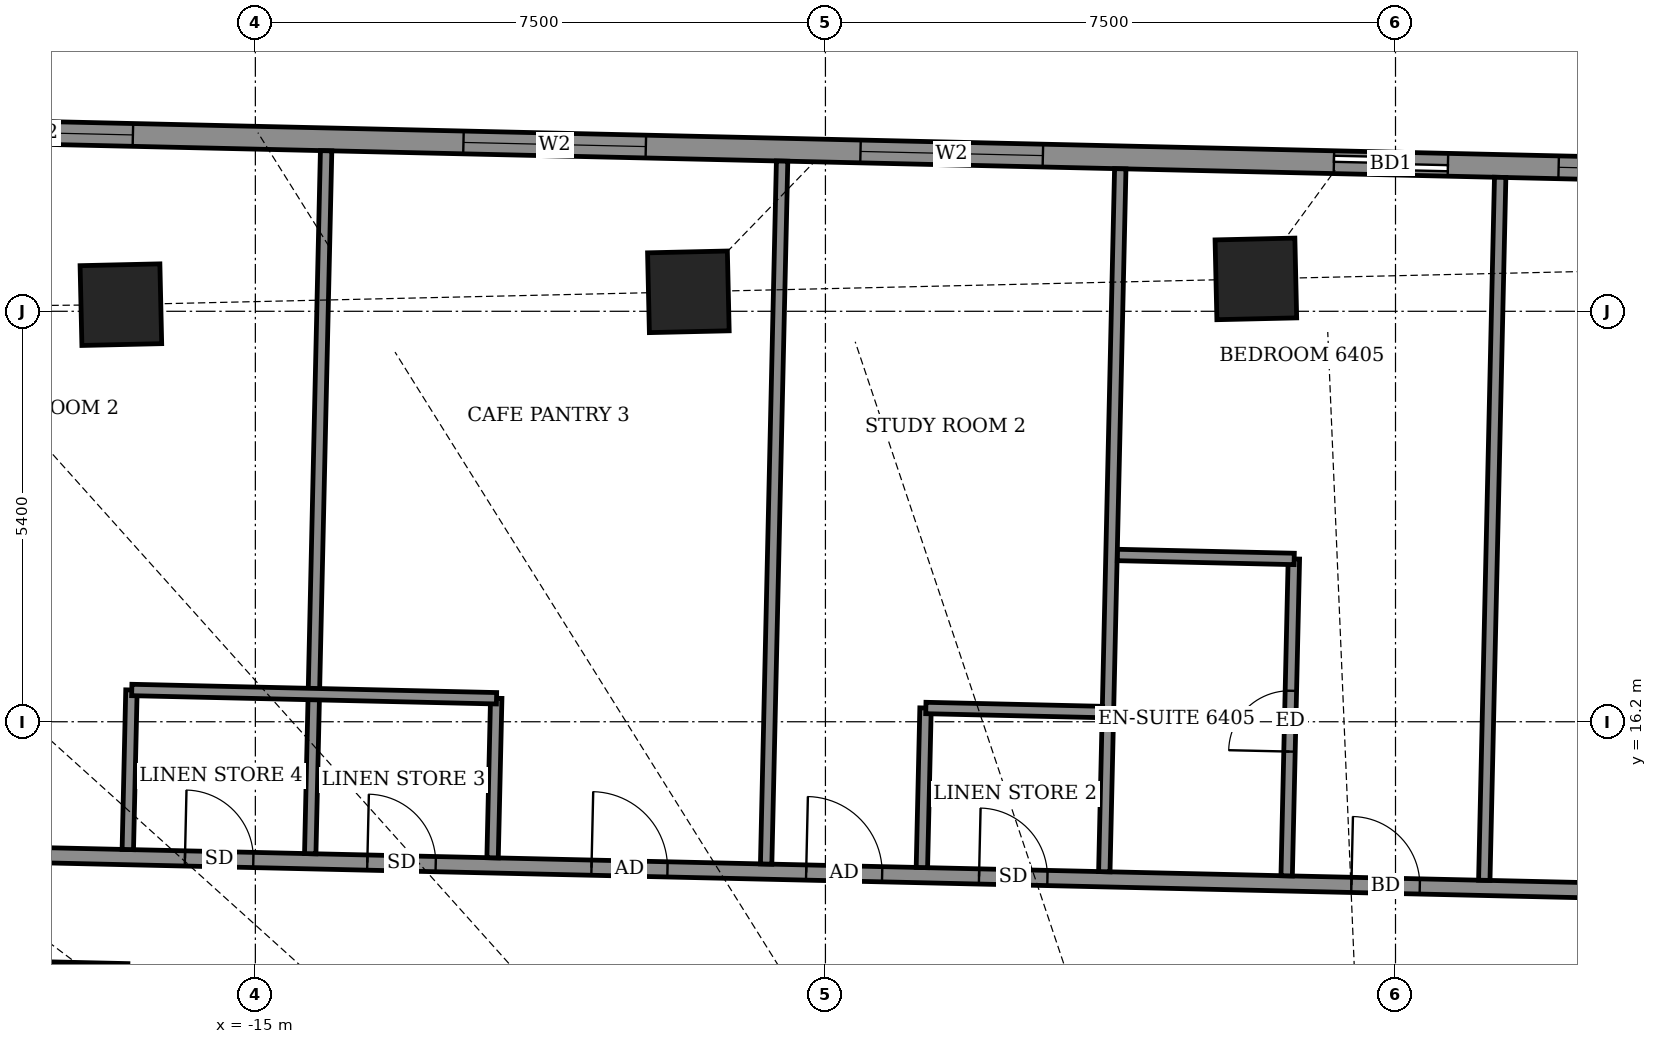
"""IFC4 building model, lengths in metres.
Left out: names, types, materials, properties, quantities, classifications, styles, units other than length and angle.
Written with IfcOpenShell. Run it as: python <this file> out.ifc"""

import sys

from ifc_helpers import new_model, si_unit, direction, frame, frame_2d, origin, origin_2d, place, context, subcontext, project, spatial, rectangle, extrude, element, fill, save


model = new_model("IFC4")
c1 = context("Model", 3, precision=1e-05, world=origin(), true_north=direction((0.0, 1.0)))
c2 = subcontext(c1, "Body", "Model", "MODEL_VIEW")
j1 = project(units=[si_unit("LENGTHUNIT", "METRE"), si_unit("PLANEANGLEUNIT", "RADIAN")], contexts=[c1])
p1 = place(None, origin())
s1 = spatial("IfcSite", under=j1, at=p1, CompositionType="ELEMENT")
p2 = place(p1, origin())
s2 = spatial("IfcBuilding", under=s1, at=p2, CompositionType="ELEMENT")
p3 = place(p2, frame((0.0, 0.0, 252.7)))
s3 = spatial("IfcBuildingStorey", under=s2, at=p3, CompositionType="ELEMENT", Elevation=252.7)
for number, where, z_axis, x_axis in (
    (1, (-1.837, 22.026, -0.55), (0.0, 0.0, 1.0), (-1.0, -0.023, 0.0)),
    (2, (-9.303, 21.856, -0.55), (0.0, 0.0, 1.0), (-1.0, -0.023, 0.0)),
    (3, (-16.769, 21.687, -0.55), (0.0, 0.0, 1.0), (-1.0, -0.023, 0.0)),
):
    element("IfcColumn", number, at=place(p3, frame(where, z_axis=z_axis, x_axis=x_axis)), inside=s3, PredefinedType="COLUMN", context=c2, shape_type="SweptSolid", body=[
        extrude(rectangle(XDim=1.05, YDim=1.05, at=origin_2d()), origin(), (0.0, 0.0, 1.0), 4.6),
    ])
p4 = place(p3, frame((26.35, 22.945, 0.0), z_axis=(0.0, 0.0, 1.0), x_axis=(-0.999742523712, 0.022691105788, 0.0)))
e4 = element("IfcWall", 4, at=p4, inside=s3, PredefinedType="SOLIDWALL", context=c2, shape_type="SweptSolid", body=[
    extrude(rectangle(XDim=47.771, YDim=0.3, at=frame_2d((23.886, 0.0))), origin(), (0.0, 0.0, 1.0), 2.45),
])
p5 = place(p4, frame((1.969, 0.0, 0.0)))
e5 = element("IfcOpeningElement", 5, at=p5, cuts=e4, PredefinedType="OPENING", context=c2, shape_type="SweptSolid", body=[
    extrude(rectangle(XDim=1.5, YDim=2.4, at=frame_2d((0.75, 1.2))), frame((0.0, 0.16, 0.0), z_axis=(0.0, -1.0, 0.0), x_axis=(1.0, 0.0, 0.0)), (0.0, 0.0, 1.0), 0.32),
])
p6 = place(p4, frame((9.356, 0.0, 0.9)))
e6 = element("IfcOpeningElement", 6, at=p6, cuts=e4, PredefinedType="OPENING", context=c2, shape_type="SweptSolid", body=[
    extrude(rectangle(XDim=2.4, YDim=1.5, at=frame_2d((1.2, 0.75))), frame((0.0, 0.16, 0.0), z_axis=(0.0, -1.0, 0.0), x_axis=(1.0, 0.0, 0.0)), (0.0, 0.0, 1.0), 0.32),
])
p7 = place(p4, frame((21.81, 0.0, 0.9)))
e7 = element("IfcOpeningElement", 7, at=p7, cuts=e4, PredefinedType="OPENING", context=c2, shape_type="SweptSolid", body=[
    extrude(rectangle(XDim=2.4, YDim=1.5, at=frame_2d((1.2, 0.75))), frame((0.0, 0.16, 0.0), z_axis=(0.0, -1.0, 0.0), x_axis=(1.0, 0.0, 0.0)), (0.0, 0.0, 1.0), 0.32),
])
p8 = place(p4, frame((25.667, 0.0, 0.0)))
e8 = element("IfcOpeningElement", 8, at=p8, cuts=e4, PredefinedType="OPENING", context=c2, shape_type="SweptSolid", body=[
    extrude(rectangle(XDim=1.5, YDim=2.4, at=frame_2d((0.75, 1.2))), frame((0.0, 0.16, 0.0), z_axis=(0.0, -1.0, 0.0), x_axis=(1.0, 0.0, 0.0)), (0.0, 0.0, 1.0), 0.32),
])
p9 = place(p4, frame((30.997, 0.0, 0.9)))
e9 = element("IfcOpeningElement", 9, at=p9, cuts=e4, PredefinedType="OPENING", context=c2, shape_type="SweptSolid", body=[
    extrude(rectangle(XDim=2.4, YDim=1.5, at=frame_2d((1.2, 0.75))), frame((0.0, 0.16, 0.0), z_axis=(0.0, -1.0, 0.0), x_axis=(1.0, 0.0, 0.0)), (0.0, 0.0, 1.0), 0.32),
])
p10 = place(p4, frame((36.222, 0.0, 0.9)))
e10 = element("IfcOpeningElement", 10, at=p10, cuts=e4, PredefinedType="OPENING", context=c2, shape_type="SweptSolid", body=[
    extrude(rectangle(XDim=2.4, YDim=1.5, at=frame_2d((1.2, 0.75))), frame((0.0, 0.16, 0.0), z_axis=(0.0, -1.0, 0.0), x_axis=(1.0, 0.0, 0.0)), (0.0, 0.0, 1.0), 0.32),
])
p11 = place(p4, frame((42.972, 0.0, 0.9)))
e11 = element("IfcOpeningElement", 11, at=p11, cuts=e4, PredefinedType="OPENING", context=c2, shape_type="SweptSolid", body=[
    extrude(rectangle(XDim=2.4, YDim=1.5, at=frame_2d((1.2, 0.75))), frame((0.0, 0.16, 0.0), z_axis=(0.0, -1.0, 0.0), x_axis=(1.0, 0.0, 0.0)), (0.0, 0.0, 1.0), 0.32),
])
p12 = place(p3, frame((-25.008, 13.107, 0.0), z_axis=(0.0, 0.0, 1.0), x_axis=(0.999742742467, -0.022681465666, 0.0)))
e12 = element("IfcWall", 12, at=p12, inside=s3, PredefinedType="PARTITIONING", context=c2, shape_type="SweptSolid", body=[
    extrude(rectangle(XDim=8.331, YDim=0.2, at=frame_2d((4.166, 0.0))), origin(), (0.0, 0.0, 1.0), 2.55),
])
p13 = place(p12, frame((2.966, 0.0, 0.0)))
e13 = element("IfcOpeningElement", 13, at=p13, cuts=e12, PredefinedType="OPENING", context=c2, shape_type="SweptSolid", body=[
    extrude(rectangle(XDim=1.0, YDim=2.1, at=frame_2d((0.5, 1.05))), frame((0.0, 0.11, 0.0), z_axis=(0.0, -1.0, 0.0), x_axis=(1.0, 0.0, 0.0)), (0.0, 0.0, 1.0), 0.22),
])
p14 = place(p3, frame((-24.974, 14.607, 0.0), z_axis=(0.0, 0.0, 1.0), x_axis=(0.999742823946, -0.02267787398, 0.0)))
e14 = element("IfcWall", 14, at=p14, inside=s3, PredefinedType="PARTITIONING", context=c2, shape_type="SweptSolid", body=[
    extrude(rectangle(XDim=48.284, YDim=0.2, at=frame_2d((24.142, 0.0))), origin(), (0.0, 0.0, 1.0), 2.45),
])
p15 = place(p14, frame((46.283, 0.0, 0.0)))
e15 = element("IfcOpeningElement", 15, at=p15, cuts=e14, PredefinedType="OPENING", context=c2, shape_type="SweptSolid", body=[
    extrude(rectangle(XDim=1.0, YDim=2.1, at=frame_2d((0.5, 1.05))), frame((0.0, 0.11, 0.0), z_axis=(0.0, -1.0, 0.0), x_axis=(1.0, 0.0, 0.0)), (0.0, 0.0, 1.0), 0.22),
])
p16 = place(p14, frame((43.75, 0.0, 0.0)))
e16 = element("IfcOpeningElement", 16, at=p16, cuts=e14, PredefinedType="OPENING", context=c2, shape_type="SweptSolid", body=[
    extrude(rectangle(XDim=0.9, YDim=2.1, at=frame_2d((0.45, 1.05))), frame((0.0, 0.11, 0.0), z_axis=(0.0, -1.0, 0.0), x_axis=(1.0, 0.0, 0.0)), (0.0, 0.0, 1.0), 0.22),
])
p17 = place(p14, frame((39.4, 0.0, 0.0)))
e17 = element("IfcOpeningElement", 17, at=p17, cuts=e14, PredefinedType="OPENING", context=c2, shape_type="SweptSolid", body=[
    extrude(rectangle(XDim=1.0, YDim=2.1, at=frame_2d((0.5, 1.05))), frame((0.0, 0.11, 0.0), z_axis=(0.0, -1.0, 0.0), x_axis=(1.0, 0.0, 0.0)), (0.0, 0.0, 1.0), 0.22),
])
p18 = place(p14, frame((35.25, 0.0, 0.0)))
e18 = element("IfcOpeningElement", 18, at=p18, cuts=e14, PredefinedType="OPENING", context=c2, shape_type="SweptSolid", body=[
    extrude(rectangle(XDim=0.9, YDim=2.1, at=frame_2d((0.45, 1.05))), frame((0.0, 0.11, 0.0), z_axis=(0.0, -1.0, 0.0), x_axis=(1.0, 0.0, 0.0)), (0.0, 0.0, 1.0), 0.22),
])
p19 = place(p14, frame((28.625, 0.0, 0.0)))
e19 = element("IfcOpeningElement", 19, at=p19, cuts=e14, PredefinedType="OPENING", context=c2, shape_type="SweptSolid", body=[
    extrude(rectangle(XDim=1.0, YDim=2.1, at=frame_2d((0.5, 1.05))), frame((0.0, 0.11, 0.0), z_axis=(0.0, -1.0, 0.0), x_axis=(1.0, 0.0, 0.0)), (0.0, 0.0, 1.0), 0.22),
])
p20 = place(p14, frame((32.85, 0.0, 0.0)))
e20 = element("IfcOpeningElement", 20, at=p20, cuts=e14, PredefinedType="OPENING", context=c2, shape_type="SweptSolid", body=[
    extrude(rectangle(XDim=0.9, YDim=2.1, at=frame_2d((0.45, 1.05))), frame((0.0, 0.11, 0.0), z_axis=(0.0, -1.0, 0.0), x_axis=(1.0, 0.0, 0.0)), (0.0, 0.0, 1.0), 0.22),
])
p21 = place(p14, frame((24.4, 0.0, 0.0)))
e21 = element("IfcOpeningElement", 21, at=p21, cuts=e14, PredefinedType="OPENING", context=c2, shape_type="SweptSolid", body=[
    extrude(rectangle(XDim=0.9, YDim=2.1, at=frame_2d((0.45, 1.05))), frame((0.0, 0.11, 0.0), z_axis=(0.0, -1.0, 0.0), x_axis=(1.0, 0.0, 0.0)), (0.0, 0.0, 1.0), 0.22),
])
p22 = place(p14, frame((17.225, 0.0, 0.0)))
e22 = element("IfcOpeningElement", 22, at=p22, cuts=e14, PredefinedType="OPENING", context=c2, shape_type="SweptSolid", body=[
    extrude(rectangle(XDim=1.0, YDim=2.1, at=frame_2d((0.5, 1.05))), frame((0.0, 0.11, 0.0), z_axis=(0.0, -1.0, 0.0), x_axis=(1.0, 0.0, 0.0)), (0.0, 0.0, 1.0), 0.22),
])
p23 = place(p14, frame((19.5, 0.0, 0.0)))
e23 = element("IfcOpeningElement", 23, at=p23, cuts=e14, PredefinedType="OPENING", context=c2, shape_type="SweptSolid", body=[
    extrude(rectangle(XDim=0.9, YDim=2.1, at=frame_2d((0.45, 1.05))), frame((0.0, 0.11, 0.0), z_axis=(0.0, -1.0, 0.0), x_axis=(1.0, 0.0, 0.0)), (0.0, 0.0, 1.0), 0.22),
])
p24 = place(p14, frame((14.4, 0.0, 0.0)))
e24 = element("IfcOpeningElement", 24, at=p24, cuts=e14, PredefinedType="OPENING", context=c2, shape_type="SweptSolid", body=[
    extrude(rectangle(XDim=1.0, YDim=2.1, at=frame_2d((0.5, 1.05))), frame((0.0, 0.11, 0.0), z_axis=(0.0, -1.0, 0.0), x_axis=(1.0, 0.0, 0.0)), (0.0, 0.0, 1.0), 0.22),
])
p25 = place(p14, frame((11.45, 0.0, 0.0)))
e25 = element("IfcOpeningElement", 25, at=p25, cuts=e14, PredefinedType="OPENING", context=c2, shape_type="SweptSolid", body=[
    extrude(rectangle(XDim=0.9, YDim=2.1, at=frame_2d((0.45, 1.05))), frame((0.0, 0.11, 0.0), z_axis=(0.0, -1.0, 0.0), x_axis=(1.0, 0.0, 0.0)), (0.0, 0.0, 1.0), 0.22),
])
p26 = place(p14, frame((2.95, 0.0, 0.0)))
e26 = element("IfcOpeningElement", 26, at=p26, cuts=e14, PredefinedType="OPENING", context=c2, shape_type="SweptSolid", body=[
    extrude(rectangle(XDim=1.0, YDim=2.1, at=frame_2d((0.5, 1.05))), frame((0.0, 0.11, 0.0), z_axis=(0.0, -1.0, 0.0), x_axis=(1.0, 0.0, 0.0)), (0.0, 0.0, 1.0), 0.22),
])
p27 = place(p14, frame((9.05, 0.0, 0.0)))
e27 = element("IfcOpeningElement", 27, at=p27, cuts=e14, PredefinedType="OPENING", context=c2, shape_type="SweptSolid", body=[
    extrude(rectangle(XDim=0.9, YDim=2.1, at=frame_2d((0.45, 1.05))), frame((0.0, 0.11, 0.0), z_axis=(0.0, -1.0, 0.0), x_axis=(1.0, 0.0, 0.0)), (0.0, 0.0, 1.0), 0.22),
])
p28 = place(p3, frame((-16.678, 14.519, 0.0), z_axis=(0.0, 0.0, 1.0), x_axis=(0.022908956429, 0.999737555419, 0.0)))
e28 = element("IfcWall", 28, at=p28, inside=s3, PredefinedType="PARTITIONING", context=c2, shape_type="SweptSolid", body=[
    extrude(rectangle(XDim=2.099, YDim=0.15, at=frame_2d((1.05, 0.0))), origin(), (0.0, 0.0, 1.0), 2.45),
])
p29 = place(p3, frame((-14.278, 14.464, 0.0), z_axis=(0.0, 0.0, 1.0), x_axis=(0.022592505393, 0.999744756775, 0.0)))
e29 = element("IfcWall", 29, at=p29, inside=s3, PredefinedType="PARTITIONING", context=c2, shape_type="SweptSolid", body=[
    extrude(rectangle(XDim=9.25, YDim=0.15, at=frame_2d((4.625, 0.0))), origin(), (0.0, 0.0, 1.0), 2.45),
])
p30 = place(p3, frame((-11.879, 14.41, 0.0), z_axis=(0.0, 0.0, 1.0), x_axis=(0.02279007832, 0.999740272436, 0.0)))
e30 = element("IfcWall", 30, at=p30, inside=s3, PredefinedType="PARTITIONING", context=c2, shape_type="SweptSolid", body=[
    extrude(rectangle(XDim=2.1, YDim=0.15, at=frame_2d((1.05, 0.0))), origin(), (0.0, 0.0, 1.0), 4.05),
])
p31 = place(p3, frame((-8.28, 14.328, 0.0), z_axis=(0.0, 0.0, 1.0), x_axis=(0.022697424684, 0.999742380272, 0.0)))
e31 = element("IfcWall", 31, at=p31, inside=s3, PredefinedType="PARTITIONING", context=c2, shape_type="SweptSolid", body=[
    extrude(rectangle(XDim=9.25, YDim=0.15, at=frame_2d((4.625, 0.0))), origin(), (0.0, 0.0, 1.0), 2.45),
])
p32 = place(p3, frame((-6.231, 14.282, 0.0), z_axis=(0.0, 0.0, 1.0), x_axis=(0.02279007832, 0.999740272436, 0.0)))
e32 = element("IfcWall", 32, at=p32, inside=s3, PredefinedType="PARTITIONING", context=c2, shape_type="SweptSolid", body=[
    extrude(rectangle(XDim=2.1, YDim=0.15, at=frame_2d((1.05, 0.0))), origin(), (0.0, 0.0, 1.0), 2.85),
])
p33 = place(p3, frame((-3.831, 14.227, 0.0), z_axis=(0.0, 0.0, 1.0), x_axis=(0.022697424684, 0.999742380272, 0.0)))
e33 = element("IfcWall", 33, at=p33, inside=s3, PredefinedType="PARTITIONING", context=c2, shape_type="SweptSolid", body=[
    extrude(rectangle(XDim=9.25, YDim=0.15, at=frame_2d((4.625, 0.0))), origin(), (0.0, 0.0, 1.0), 2.45),
])
p34 = place(p3, frame((-1.432, 14.173, 0.0), z_axis=(0.0, 0.0, 1.0), x_axis=(0.022774601966, 0.999740625115, 0.0)))
e34 = element("IfcWall", 34, at=p34, inside=s3, PredefinedType="PARTITIONING", context=c2, shape_type="SweptSolid", body=[
    extrude(rectangle(XDim=4.17, YDim=0.15, at=frame_2d((2.085, 0.0))), origin(), (0.0, 0.0, 1.0), 2.85),
])
p35 = place(p34, frame((1.635, 0.0, 0.0)))
e35 = element("IfcOpeningElement", 35, at=p35, cuts=e34, PredefinedType="OPENING", context=c2, shape_type="SweptSolid", body=[
    extrude(rectangle(XDim=0.8, YDim=2.1, at=frame_2d((0.4, 1.05))), frame((0.0, 0.085, 0.0), z_axis=(0.0, -1.0, 0.0), x_axis=(1.0, 0.0, 0.0)), (0.0, 0.0, 1.0), 0.17),
])
p36 = place(p3, frame((1.168, 14.114, 0.0), z_axis=(0.0, 0.0, 1.0), x_axis=(0.022591909275, 0.999744770247, 0.0)))
e36 = element("IfcWall", 36, at=p36, inside=s3, PredefinedType="PARTITIONING", context=c2, shape_type="SweptSolid", body=[
    extrude(rectangle(XDim=9.25, YDim=0.15, at=frame_2d((4.625, 0.0))), origin(), (0.0, 0.0, 1.0), 2.45),
])
p37 = place(p3, frame((-16.626, 16.618, 0.0), z_axis=(0.0, 0.0, 1.0), x_axis=(0.999742701292, -0.022683280499, 0.0)))
e37 = element("IfcWall", 37, at=p37, inside=s3, PredefinedType="PARTITIONING", context=c2, shape_type="SweptSolid", body=[
    extrude(rectangle(XDim=4.8, YDim=0.15, at=frame_2d((2.4, 0.0))), origin(), (0.0, 0.0, 1.0), 2.75),
])
p38 = place(p3, frame((-6.179, 16.381, 0.0), z_axis=(0.0, 0.0, 1.0), x_axis=(0.999737862264, -0.022895561926, 0.0)))
e38 = element("IfcWall", 38, at=p38, inside=s3, PredefinedType="PARTITIONING", context=c2, shape_type="SweptSolid", body=[
    extrude(rectangle(XDim=2.324, YDim=0.15, at=frame_2d((1.162, 0.0))), origin(), (0.0, 0.0, 1.0), 2.85),
])
p39 = place(p3, frame((-3.658, 18.394, 0.0), z_axis=(0.0, 0.0, 1.0), x_axis=(0.999749954681, -0.022361308448, 0.0)))
e39 = element("IfcWall", 39, at=p39, inside=s3, PredefinedType="PARTITIONING", context=c2, shape_type="SweptSolid", body=[
    extrude(rectangle(XDim=2.325, YDim=0.15, at=frame_2d((1.163, 0.0))), origin(), (0.0, 0.0, 1.0), 2.85),
])
p40 = place(p7, origin())
e40 = element("IfcWindow", 40, at=p40, inside=s3, PartitioningType="DOUBLE_PANEL_VERTICAL", PredefinedType="WINDOW", context=c2, shape_type="SweptSolid", body=[
    extrude(rectangle(XDim=2.4, YDim=1.5, at=frame_2d((1.2, 0.75))), frame((0.0, 0.03, 0.0), z_axis=(0.0, -1.0, 0.0), x_axis=(1.0, 0.0, 0.0)), (0.0, 0.0, 1.0), 0.06),
])
fill(e7, e40)
p41 = place(p8, origin())
e41 = element("IfcDoor", 41, at=p41, inside=s3, OperationType="SLIDING_TO_LEFT", PredefinedType="DOOR", context=c2, shape_type="SweptSolid", body=[
    extrude(rectangle(XDim=1.5, YDim=2.4, at=frame_2d((0.75, 1.2))), frame((0.0, 0.025, 0.0), z_axis=(0.0, -1.0, 0.0), x_axis=(1.0, 0.0, 0.0)), (0.0, 0.0, 1.0), 0.05),
])
fill(e8, e41)
p42 = place(p9, origin())
e42 = element("IfcWindow", 42, at=p42, inside=s3, PartitioningType="DOUBLE_PANEL_VERTICAL", PredefinedType="WINDOW", context=c2, shape_type="SweptSolid", body=[
    extrude(rectangle(XDim=2.4, YDim=1.5, at=frame_2d((1.2, 0.75))), frame((0.0, 0.03, 0.0), z_axis=(0.0, -1.0, 0.0), x_axis=(1.0, 0.0, 0.0)), (0.0, 0.0, 1.0), 0.06),
])
fill(e9, e42)
p43 = place(p10, origin())
e43 = element("IfcWindow", 43, at=p43, inside=s3, PartitioningType="DOUBLE_PANEL_VERTICAL", PredefinedType="WINDOW", context=c2, shape_type="SweptSolid", body=[
    extrude(rectangle(XDim=2.4, YDim=1.5, at=frame_2d((1.2, 0.75))), frame((0.0, 0.03, 0.0), z_axis=(0.0, -1.0, 0.0), x_axis=(1.0, 0.0, 0.0)), (0.0, 0.0, 1.0), 0.06),
])
fill(e10, e43)
p44 = place(p11, origin())
e44 = element("IfcWindow", 44, at=p44, inside=s3, PartitioningType="DOUBLE_PANEL_VERTICAL", PredefinedType="WINDOW", context=c2, shape_type="SweptSolid", body=[
    extrude(rectangle(XDim=2.4, YDim=1.5, at=frame_2d((1.2, 0.75))), frame((0.0, 0.03, 0.0), z_axis=(0.0, -1.0, 0.0), x_axis=(1.0, 0.0, 0.0)), (0.0, 0.0, 1.0), 0.06),
])
fill(e11, e44)
p45 = place(p21, origin())
e45 = element("IfcDoor", 45, at=p45, inside=s3, OperationType="SINGLE_SWING_LEFT", PredefinedType="DOOR", context=c2, shape_type="SweptSolid", body=[
    extrude(rectangle(XDim=0.9, YDim=2.1, at=frame_2d((0.45, 1.05))), frame((0.0, 0.025, 0.0), z_axis=(0.0, -1.0, 0.0), x_axis=(1.0, 0.0, 0.0)), (0.0, 0.0, 1.0), 0.05),
])
fill(e21, e45)
p46 = place(p35, origin())
e46 = element("IfcDoor", 46, at=p46, inside=s3, OperationType="SINGLE_SWING_LEFT", PredefinedType="DOOR", context=c2, shape_type="SweptSolid", body=[
    extrude(rectangle(XDim=0.8, YDim=2.1, at=frame_2d((0.4, 1.05))), frame((0.0, 0.025, 0.0), z_axis=(0.0, -1.0, 0.0), x_axis=(1.0, 0.0, 0.0)), (0.0, 0.0, 1.0), 0.05),
])
fill(e35, e46)
p47 = place(p22, origin())
e47 = element("IfcDoor", 47, at=p47, inside=s3, OperationType="SINGLE_SWING_RIGHT", PredefinedType="DOOR", context=c2, shape_type="SweptSolid", body=[
    extrude(rectangle(XDim=1.0, YDim=2.1, at=frame_2d((0.5, 1.05))), frame((0.0, 0.025, 0.0), z_axis=(0.0, -1.0, 0.0), x_axis=(1.0, 0.0, 0.0)), (0.0, 0.0, 1.0), 0.05),
])
fill(e22, e47)
p48 = place(p23, origin())
e48 = element("IfcDoor", 48, at=p48, inside=s3, OperationType="SINGLE_SWING_RIGHT", PredefinedType="DOOR", context=c2, shape_type="SweptSolid", body=[
    extrude(rectangle(XDim=0.9, YDim=2.1, at=frame_2d((0.45, 1.05))), frame((0.0, 0.025, 0.0), z_axis=(0.0, -1.0, 0.0), x_axis=(1.0, 0.0, 0.0)), (0.0, 0.0, 1.0), 0.05),
])
fill(e23, e48)
p49 = place(p24, origin())
e49 = element("IfcDoor", 49, at=p49, inside=s3, OperationType="SINGLE_SWING_LEFT", PredefinedType="DOOR", context=c2, shape_type="SweptSolid", body=[
    extrude(rectangle(XDim=1.0, YDim=2.1, at=frame_2d((0.5, 1.05))), frame((0.0, 0.025, 0.0), z_axis=(0.0, -1.0, 0.0), x_axis=(1.0, 0.0, 0.0)), (0.0, 0.0, 1.0), 0.05),
])
fill(e24, e49)
p50 = place(p25, origin())
e50 = element("IfcDoor", 50, at=p50, inside=s3, OperationType="SINGLE_SWING_LEFT", PredefinedType="DOOR", context=c2, shape_type="SweptSolid", body=[
    extrude(rectangle(XDim=0.9, YDim=2.1, at=frame_2d((0.45, 1.05))), frame((0.0, 0.025, 0.0), z_axis=(0.0, -1.0, 0.0), x_axis=(1.0, 0.0, 0.0)), (0.0, 0.0, 1.0), 0.05),
])
fill(e25, e50)
p51 = place(p27, origin())
e51 = element("IfcDoor", 51, at=p51, inside=s3, OperationType="SINGLE_SWING_RIGHT", PredefinedType="DOOR", context=c2, shape_type="SweptSolid", body=[
    extrude(rectangle(XDim=0.9, YDim=2.1, at=frame_2d((0.45, 1.05))), frame((0.0, 0.025, 0.0), z_axis=(0.0, -1.0, 0.0), x_axis=(1.0, 0.0, 0.0)), (0.0, 0.0, 1.0), 0.05),
])
fill(e27, e51)
save(model, sys.argv[1])
